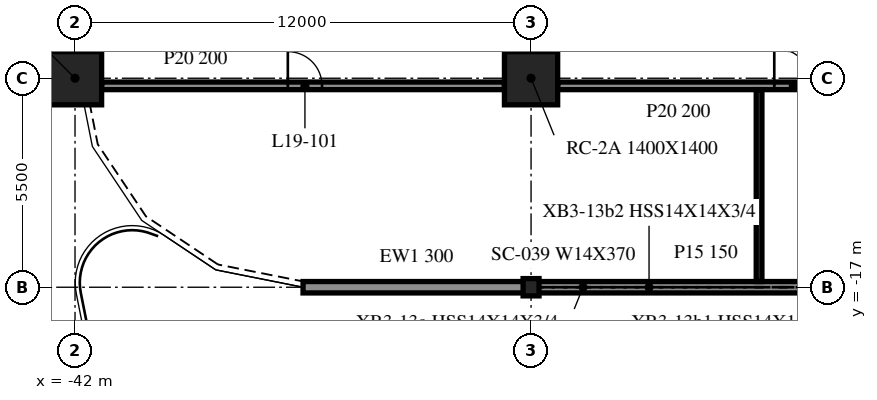
"""IFC4 building model, lengths in metres.
Left out: names, types, materials, properties, quantities, classifications, styles, units other than length and angle.
Written with IfcOpenShell. Run it as: python <this file> out.ifc"""

import sys

from ifc_helpers import new_model, si_unit, direction, frame, frame_2d, origin, origin_2d, place, context, subcontext, project, spatial, rectangle, i_section, extrude, element, fill, save


model = new_model("IFC4")
c1 = context("Model", 3, precision=1e-05, world=origin(), true_north=direction((0.0, 1.0)))
c2 = subcontext(c1, "Body", "Model", "MODEL_VIEW")
j1 = project(units=[si_unit("LENGTHUNIT", "METRE"), si_unit("PLANEANGLEUNIT", "RADIAN")], contexts=[c1])
p1 = place(None, origin())
s1 = spatial("IfcSite", under=j1, at=p1, CompositionType="ELEMENT")
p2 = place(p1, origin())
s2 = spatial("IfcBuilding", under=s1, at=p2, CompositionType="ELEMENT")
p3 = place(p2, frame((0.0, 0.0, 84.8)))
s3 = spatial("IfcBuildingStorey", under=s2, at=p3, CompositionType="ELEMENT", Elevation=84.8)
for number, where, z_axis, x_axis in (
    (1, (-42.0, -11.5, -0.34), (0.0, 0.0, 1.0), (1.0, 0.0, 0.0)),
    (2, (-30.0, -11.5, -0.34), (0.0, 0.0, 1.0), (1.0, 0.0, 0.0)),
):
    element("IfcColumn", number, at=place(p3, frame(where, z_axis=z_axis, x_axis=x_axis)), inside=s3, PredefinedType="COLUMN", context=c2, shape_type="SweptSolid", body=[
        extrude(rectangle(XDim=1.4, YDim=1.4, at=origin_2d()), origin(), (0.0, 0.0, 1.0), 4.1),
    ])
p4 = place(p3, frame((-30.0, -17.0, -0.34), z_axis=(0.0, 0.0, 1.0), x_axis=(1.0, 0.0, 0.0)))
e3 = element("IfcColumn", 3, at=p4, inside=s3, PredefinedType="COLUMN", context=c2, shape_type="SweptSolid", body=[
    extrude(i_section(OverallWidth=0.419, OverallDepth=0.455, WebThickness=0.042, FlangeThickness=0.068, at=origin_2d()), origin(), (0.0, 0.0, 1.0), 4.1),
])
p5 = place(p3, frame((-36.0, -17.0, 0.0), z_axis=(0.0, 0.0, 1.0), x_axis=(1.0, 0.0, 0.0)))
e4 = element("IfcWall", 4, at=p5, inside=s3, PredefinedType="NOTDEFINED", context=c2, shape_type="SweptSolid", body=[
    extrude(rectangle(XDim=5.979, YDim=0.3, at=frame_2d((2.99, 0.0))), origin(), (0.0, 0.0, 1.0), 3.003),
])
p6 = place(p3, frame((-29.979, -17.0, 0.0), z_axis=(0.0, 0.0, 1.0), x_axis=(1.0, 0.0, 0.0)))
e5 = element("IfcWall", 5, at=p6, inside=s3, PredefinedType="NOTDEFINED", context=c2, shape_type="SweptSolid", body=[
    extrude(rectangle(XDim=11.958, YDim=0.3, at=frame_2d((5.979, 0.0))), origin(), (0.0, 0.0, 1.0), 3.003),
])
p7 = place(p3, frame((-41.3, -11.7, 0.0), z_axis=(0.0, 0.0, 1.0), x_axis=(1.0, 0.0, 0.0)))
e6 = element("IfcWall", 6, at=p7, inside=s3, PredefinedType="PARTITIONING", context=c2, shape_type="SweptSolid", body=[
    extrude(rectangle(XDim=10.6, YDim=0.2, at=frame_2d((5.3, 0.0))), origin(), (0.0, 0.0, 1.0), 3.76),
])
p8 = place(p7, frame((4.9, 0.0, 0.0)))
e7 = element("IfcOpeningElement", 7, at=p8, cuts=e6, PredefinedType="OPENING", context=c2, shape_type="SweptSolid", body=[
    extrude(rectangle(XDim=0.9, YDim=2.1, at=frame_2d((0.45, 1.05))), frame((0.0, 0.11, 0.0), z_axis=(0.0, -1.0, 0.0), x_axis=(1.0, 0.0, 0.0)), (0.0, 0.0, 1.0), 0.22),
])
p9 = place(p3, frame((-29.3, -11.7, 0.0), z_axis=(0.0, 0.0, 1.0), x_axis=(1.0, 0.0, 0.0)))
e8 = element("IfcWall", 8, at=p9, inside=s3, PredefinedType="PARTITIONING", context=c2, shape_type="SweptSolid", body=[
    extrude(rectangle(XDim=10.6, YDim=0.2, at=frame_2d((5.3, 0.0))), origin(), (0.0, 0.0, 1.0), 3.76),
])
p10 = place(p9, frame((5.7, 0.0, 0.0)))
e9 = element("IfcOpeningElement", 9, at=p10, cuts=e8, PredefinedType="OPENING", context=c2, shape_type="SweptSolid", body=[
    extrude(rectangle(XDim=1.0, YDim=2.1, at=frame_2d((0.5, 1.05))), frame((0.0, 0.11, 0.0), z_axis=(0.0, -1.0, 0.0), x_axis=(1.0, 0.0, 0.0)), (0.0, 0.0, 1.0), 0.22),
])
p11 = place(p3, frame((-24.0, -16.85, 0.0), z_axis=(0.0, 0.0, 1.0), x_axis=(0.0, 1.0, 0.0)))
e10 = element("IfcWall", 10, at=p11, inside=s3, PredefinedType="PARTITIONING", context=c2, shape_type="SweptSolid", body=[
    extrude(rectangle(XDim=5.05, YDim=0.15, at=frame_2d((2.525, 0.0))), origin(), (0.0, 0.0, 1.0), 3.76),
])
p12 = place(p8, origin())
e11 = element("IfcDoor", 11, at=p12, inside=s3, OperationType="SINGLE_SWING_LEFT", PredefinedType="DOOR", context=c2, shape_type="SweptSolid", body=[
    extrude(rectangle(XDim=0.9, YDim=2.1, at=frame_2d((0.45, 1.05))), frame((0.0, 0.025, 0.0), z_axis=(0.0, -1.0, 0.0), x_axis=(1.0, 0.0, 0.0)), (0.0, 0.0, 1.0), 0.05),
])
fill(e7, e11)
p13 = place(p10, origin())
e12 = element("IfcDoor", 12, at=p13, inside=s3, OperationType="SINGLE_SWING_LEFT", PredefinedType="DOOR", context=c2, shape_type="SweptSolid", body=[
    extrude(rectangle(XDim=1.0, YDim=2.1, at=frame_2d((0.5, 1.05))), frame((0.0, 0.025, 0.0), z_axis=(0.0, -1.0, 0.0), x_axis=(1.0, 0.0, 0.0)), (0.0, 0.0, 1.0), 0.05),
])
fill(e9, e12)
save(model, sys.argv[1])
